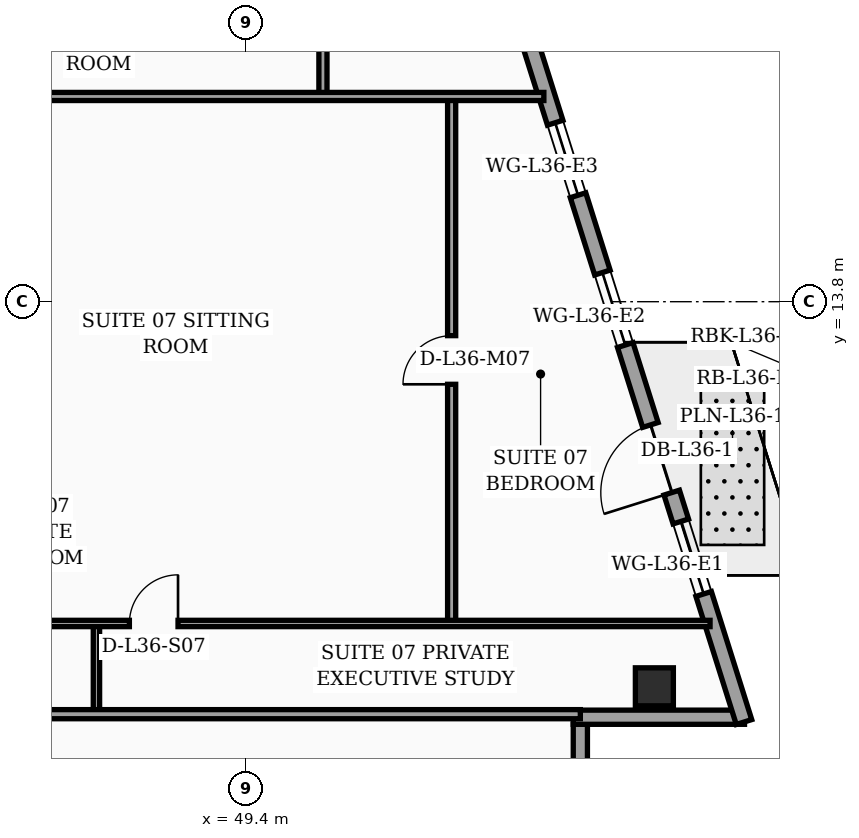
"""IFC4 building model, lengths in metres.
Left out: names, types, materials, properties, quantities, classifications, styles, units other than length and angle.
Written with IfcOpenShell. Run it as: python <this file> out.ifc"""

import sys

from ifc_helpers import new_model, si_unit, direction, frame, frame_2d, origin, origin_2d, place, context, subcontext, project, spatial, rectangle, hollow_rectangle, extrude, element, fill, save


model = new_model("IFC4")
c1 = context("Model", 3, precision=1e-05, world=origin(), true_north=direction((0.0, 1.0)))
c2 = subcontext(c1, "Body", "Model", "MODEL_VIEW")
j1 = project(units=[si_unit("LENGTHUNIT", "METRE"), si_unit("PLANEANGLEUNIT", "RADIAN")], contexts=[c1])
p1 = place(None, origin())
s1 = spatial("IfcSite", under=j1, at=p1, CompositionType="ELEMENT")
p2 = place(p1, origin())
s2 = spatial("IfcBuilding", under=s1, at=p2, CompositionType="ELEMENT")
p3 = place(p2, frame((0.0, 0.0, 148.5)))
s3 = spatial("IfcBuildingStorey", under=s2, at=p3, CompositionType="ELEMENT", Elevation=148.5)
p4 = place(p3, frame((57.461, 6.2, 0.0), z_axis=(0.0, 0.0, 1.0), x_axis=(1.0, 0.0, 0.0)))
e1 = element("IfcColumn", 1, at=p4, inside=s3, PredefinedType="COLUMN", context=c2, shape_type="SweptSolid", body=[
    extrude(hollow_rectangle(XDim=0.75, YDim=0.75, WallThickness=0.032, at=origin_2d()), origin(), (0.0, 0.0, 1.0), 3.56),
])
p5 = place(p3, frame((56.0, 2.52, 0.0), z_axis=(0.0, 0.0, 1.0), x_axis=(0.0, 1.0, 0.0)))
e2 = element("IfcWall", 2, at=p5, inside=s3, PredefinedType="SOLIDWALL", context=c2, shape_type="SweptSolid", body=[
    extrude(rectangle(XDim=2.94, YDim=0.28, at=frame_2d((1.47, 0.0))), origin(), (0.0, 0.0, 1.0), 3.04),
])
p6 = place(p3, frame((55.86, 5.6, 0.0), z_axis=(0.0, 0.0, 1.0), x_axis=(1.0, 0.0, 0.0)))
e3 = element("IfcWall", 3, at=p6, inside=s3, PredefinedType="SOLIDWALL", context=c2, shape_type="SweptSolid", body=[
    extrude(rectangle(XDim=3.38, YDim=0.28, at=frame_2d((1.69, 0.0))), origin(), (0.0, 0.0, 1.0), 3.04),
])
p7 = place(p3, frame((59.23, 5.505, 0.0), z_axis=(0.0, 0.0, 1.0), x_axis=(-0.300509063924, 0.953778958931, 0.0)))
e4 = element("IfcWall", 4, at=p7, inside=s3, PredefinedType="SOLIDWALL", context=c2, shape_type="SweptSolid", body=[
    extrude(rectangle(XDim=30.814, YDim=0.32, at=frame_2d((15.407, 0.0))), origin(), (0.0, 0.0, 1.0), 3.56),
])
p8 = place(p7, frame((4.747, 0.0, 0.0)))
e5 = element("IfcOpeningElement", 5, at=p8, cuts=e4, PredefinedType="OPENING", context=c2, shape_type="SweptSolid", body=[
    extrude(rectangle(XDim=1.4, YDim=2.25, at=frame_2d((0.7, 1.125))), frame((0.0, 0.17, 0.0), z_axis=(0.0, -1.0, 0.0), x_axis=(1.0, 0.0, 0.0)), (0.0, 0.0, 1.0), 0.34),
])
p9 = place(p7, frame((2.65, 0.0, 0.75)))
e6 = element("IfcOpeningElement", 6, at=p9, cuts=e4, PredefinedType="OPENING", context=c2, shape_type="SweptSolid", body=[
    extrude(rectangle(XDim=1.5, YDim=1.6, at=frame_2d((0.75, 0.8))), frame((0.0, 0.17, 0.0), z_axis=(0.0, -1.0, 0.0), x_axis=(1.0, 0.0, 0.0)), (0.0, 0.0, 1.0), 0.34),
])
p10 = place(p7, frame((7.8, 0.0, 0.75)))
e7 = element("IfcOpeningElement", 7, at=p10, cuts=e4, PredefinedType="OPENING", context=c2, shape_type="SweptSolid", body=[
    extrude(rectangle(XDim=1.5, YDim=1.6, at=frame_2d((0.75, 0.8))), frame((0.0, 0.17, 0.0), z_axis=(0.0, -1.0, 0.0), x_axis=(1.0, 0.0, 0.0)), (0.0, 0.0, 1.0), 0.34),
])
p11 = place(p7, frame((10.9, 0.0, 0.75)))
e8 = element("IfcOpeningElement", 8, at=p11, cuts=e4, PredefinedType="OPENING", context=c2, shape_type="SweptSolid", body=[
    extrude(rectangle(XDim=1.5, YDim=1.6, at=frame_2d((0.75, 0.8))), frame((0.0, 0.17, 0.0), z_axis=(0.0, -1.0, 0.0), x_axis=(1.0, 0.0, 0.0)), (0.0, 0.0, 1.0), 0.34),
])
p12 = place(p7, frame((14.0, 0.0, 0.75)))
e9 = element("IfcOpeningElement", 9, at=p12, cuts=e4, PredefinedType="OPENING", context=c2, shape_type="SweptSolid", body=[
    extrude(rectangle(XDim=1.5, YDim=1.6, at=frame_2d((0.75, 0.8))), frame((0.0, 0.17, 0.0), z_axis=(0.0, -1.0, 0.0), x_axis=(1.0, 0.0, 0.0)), (0.0, 0.0, 1.0), 0.34),
])
p13 = place(p7, frame((17.1, 0.0, 0.75)))
e10 = element("IfcOpeningElement", 10, at=p13, cuts=e4, PredefinedType="OPENING", context=c2, shape_type="SweptSolid", body=[
    extrude(rectangle(XDim=1.5, YDim=1.6, at=frame_2d((0.75, 0.8))), frame((0.0, 0.17, 0.0), z_axis=(0.0, -1.0, 0.0), x_axis=(1.0, 0.0, 0.0)), (0.0, 0.0, 1.0), 0.34),
])
p14 = place(p7, frame((23.3, 0.0, 0.75)))
e11 = element("IfcOpeningElement", 11, at=p14, cuts=e4, PredefinedType="OPENING", context=c2, shape_type="SweptSolid", body=[
    extrude(rectangle(XDim=1.5, YDim=1.6, at=frame_2d((0.75, 0.8))), frame((0.0, 0.17, 0.0), z_axis=(0.0, -1.0, 0.0), x_axis=(1.0, 0.0, 0.0)), (0.0, 0.0, 1.0), 0.34),
])
p15 = place(p7, frame((27.45, 0.0, 0.75)))
e12 = element("IfcOpeningElement", 12, at=p15, cuts=e4, PredefinedType="OPENING", context=c2, shape_type="SweptSolid", body=[
    extrude(rectangle(XDim=1.5, YDim=1.6, at=frame_2d((0.75, 0.8))), frame((0.0, 0.17, 0.0), z_axis=(0.0, -1.0, 0.0), x_axis=(1.0, 0.0, 0.0)), (0.0, 0.0, 1.0), 0.34),
])
p16 = place(p3, frame((46.45, 5.66, 0.0), z_axis=(0.0, 0.0, 1.0), x_axis=(0.0, 1.0, 0.0)))
e13 = element("IfcWall", 13, at=p16, inside=s3, PredefinedType="PARTITIONING", context=c2, shape_type="SweptSolid", body=[
    extrude(rectangle(XDim=1.79, YDim=0.125, at=frame_2d((0.895, 0.0))), origin(), (0.0, 0.0, 1.0), 3.56),
])
p17 = place(p3, frame((53.46, 7.45, 0.0), z_axis=(0.0, 0.0, 1.0), x_axis=(0.0, 1.0, 0.0)))
e14 = element("IfcWall", 14, at=p17, inside=s3, PredefinedType="PARTITIONING", context=c2, shape_type="SweptSolid", body=[
    extrude(rectangle(XDim=10.4, YDim=0.16, at=frame_2d((5.2, 0.0))), origin(), (0.0, 0.0, 1.0), 3.04),
])
p18 = place(p17, frame((4.72, 0.0, 0.0)))
e15 = element("IfcOpeningElement", 15, at=p18, cuts=e14, PredefinedType="OPENING", context=c2, shape_type="SweptSolid", body=[
    extrude(rectangle(XDim=0.96, YDim=2.2, at=frame_2d((0.48, 1.1))), frame((0.0, 0.09, 0.0), z_axis=(0.0, -1.0, 0.0), x_axis=(1.0, 0.0, 0.0)), (0.0, 0.0, 1.0), 0.18),
])
p19 = place(p3, frame((43.5, 7.45, 0.0), z_axis=(0.0, 0.0, 1.0), x_axis=(1.0, 0.0, 0.0)))
e16 = element("IfcWall", 16, at=p19, inside=s3, PredefinedType="PARTITIONING", context=c2, shape_type="SweptSolid", body=[
    extrude(rectangle(XDim=15.06, YDim=0.125, at=frame_2d((7.53, 0.0))), origin(), (0.0, 0.0, 1.0), 2.94),
])
p20 = place(p19, frame((0.5, 0.0, 0.0)))
e17 = element("IfcOpeningElement", 17, at=p20, cuts=e16, PredefinedType="OPENING", context=c2, shape_type="SweptSolid", body=[
    extrude(rectangle(XDim=0.9, YDim=2.15, at=frame_2d((0.45, 1.075))), frame((0.0, 0.073, 0.0), z_axis=(0.0, -1.0, 0.0), x_axis=(1.0, 0.0, 0.0)), (0.0, 0.0, 1.0), 0.145),
])
p21 = place(p19, frame((3.6, 0.0, 0.0)))
e18 = element("IfcOpeningElement", 18, at=p21, cuts=e16, PredefinedType="OPENING", context=c2, shape_type="SweptSolid", body=[
    extrude(rectangle(XDim=0.96, YDim=2.2, at=frame_2d((0.48, 1.1))), frame((0.0, 0.073, 0.0), z_axis=(0.0, -1.0, 0.0), x_axis=(1.0, 0.0, 0.0)), (0.0, 0.0, 1.0), 0.145),
])
p22 = place(p3, frame((43.5, 5.66, 0.0), z_axis=(0.0, 0.0, 1.0), x_axis=(1.0, 0.0, 0.0)))
e19 = element("IfcWall", 19, at=p22, inside=s3, PredefinedType="PARTITIONING", context=c2, shape_type="SweptSolid", body=[
    extrude(rectangle(XDim=12.5, YDim=0.18, at=frame_2d((6.25, 0.0))), origin(), (0.0, 0.0, 1.0), 2.94),
])
p23 = place(p3, frame((50.92, 17.85, 0.0), z_axis=(0.0, 0.0, 1.0), x_axis=(0.0, 1.0, 0.0)))
e20 = element("IfcWall", 20, at=p23, inside=s3, PredefinedType="PARTITIONING", context=c2, shape_type="SweptSolid", body=[
    extrude(rectangle(XDim=5.74, YDim=0.16, at=frame_2d((2.87, 0.0))), origin(), (0.0, 0.0, 1.0), 2.94),
])
p24 = place(p23, frame((2.39, 0.0, 0.0)))
e21 = element("IfcOpeningElement", 21, at=p24, cuts=e20, PredefinedType="OPENING", context=c2, shape_type="SweptSolid", body=[
    extrude(rectangle(XDim=0.96, YDim=2.2, at=frame_2d((0.48, 1.1))), frame((0.0, 0.09, 0.0), z_axis=(0.0, -1.0, 0.0), x_axis=(1.0, 0.0, 0.0)), (0.0, 0.0, 1.0), 0.18),
])
p25 = place(p3, frame((43.5, 17.85, 0.0), z_axis=(0.0, 0.0, 1.0), x_axis=(1.0, 0.0, 0.0)))
e22 = element("IfcWall", 22, at=p25, inside=s3, PredefinedType="PARTITIONING", context=c2, shape_type="SweptSolid", body=[
    extrude(rectangle(XDim=11.78, YDim=0.16, at=frame_2d((5.89, 0.0))), origin(), (0.0, 0.0, 1.0), 2.94),
])
p26 = place(p8, origin())
e23 = element("IfcDoor", 23, at=p26, inside=s3, OperationType="SINGLE_SWING_LEFT", PredefinedType="DOOR", context=c2, shape_type="SweptSolid", body=[
    extrude(rectangle(XDim=1.4, YDim=2.25, at=frame_2d((0.7, 1.125))), frame((0.0, 0.025, 0.0), z_axis=(0.0, -1.0, 0.0), x_axis=(1.0, 0.0, 0.0)), (0.0, 0.0, 1.0), 0.05),
])
fill(e5, e23)
p27 = place(p9, origin())
e24 = element("IfcWindow", 24, at=p27, inside=s3, PartitioningType="SINGLE_PANEL", PredefinedType="WINDOW", context=c2, shape_type="SweptSolid", body=[
    extrude(rectangle(XDim=1.5, YDim=1.6, at=frame_2d((0.75, 0.8))), frame((0.0, 0.03, 0.0), z_axis=(0.0, -1.0, 0.0), x_axis=(1.0, 0.0, 0.0)), (0.0, 0.0, 1.0), 0.06),
])
fill(e6, e24)
p28 = place(p10, origin())
e25 = element("IfcWindow", 25, at=p28, inside=s3, PartitioningType="SINGLE_PANEL", PredefinedType="WINDOW", context=c2, shape_type="SweptSolid", body=[
    extrude(rectangle(XDim=1.5, YDim=1.6, at=frame_2d((0.75, 0.8))), frame((0.0, 0.03, 0.0), z_axis=(0.0, -1.0, 0.0), x_axis=(1.0, 0.0, 0.0)), (0.0, 0.0, 1.0), 0.06),
])
fill(e7, e25)
p29 = place(p11, origin())
e26 = element("IfcWindow", 26, at=p29, inside=s3, PartitioningType="SINGLE_PANEL", PredefinedType="WINDOW", context=c2, shape_type="SweptSolid", body=[
    extrude(rectangle(XDim=1.5, YDim=1.6, at=frame_2d((0.75, 0.8))), frame((0.0, 0.03, 0.0), z_axis=(0.0, -1.0, 0.0), x_axis=(1.0, 0.0, 0.0)), (0.0, 0.0, 1.0), 0.06),
])
fill(e8, e26)
p30 = place(p18, origin())
e27 = element("IfcDoor", 27, at=p30, inside=s3, OperationType="SINGLE_SWING_LEFT", PredefinedType="DOOR", context=c2, shape_type="SweptSolid", body=[
    extrude(rectangle(XDim=0.96, YDim=2.2, at=frame_2d((0.48, 1.1))), frame((0.0, 0.025, 0.0), z_axis=(0.0, -1.0, 0.0), x_axis=(1.0, 0.0, 0.0)), (0.0, 0.0, 1.0), 0.05),
])
fill(e15, e27)
p31 = place(p21, origin())
e28 = element("IfcDoor", 28, at=p31, inside=s3, OperationType="SINGLE_SWING_RIGHT", PredefinedType="DOOR", context=c2, shape_type="SweptSolid", body=[
    extrude(rectangle(XDim=0.96, YDim=2.2, at=frame_2d((0.48, 1.1))), frame((0.0, 0.025, 0.0), z_axis=(0.0, -1.0, 0.0), x_axis=(1.0, 0.0, 0.0)), (0.0, 0.0, 1.0), 0.05),
])
fill(e18, e28)
save(model, sys.argv[1])
